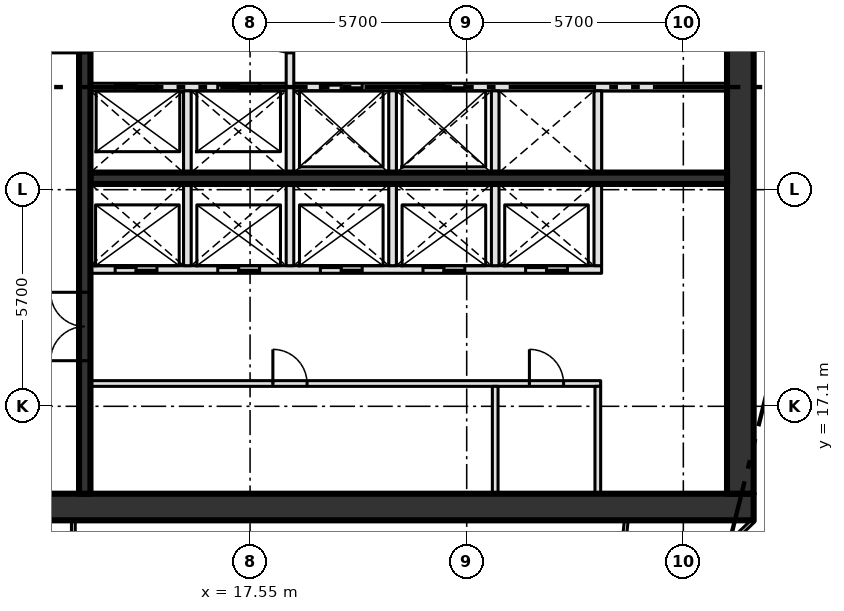
"""IFC4 building model, lengths in metres.
Left out: names, types, materials, properties, quantities, classifications, styles, units other than length and angle.
Written with IfcOpenShell. Run it as: python <this file> out.ifc"""

import sys

from ifc_helpers import new_model, si_unit, direction, frame, frame_2d, origin, place, context, subcontext, project, spatial, rectangle, extrude, element, fill, save


model = new_model("IFC4")
c1 = context("Model", 3, precision=1e-05, world=origin(), true_north=direction((0.0, 1.0)))
c2 = subcontext(c1, "Body", "Model", "MODEL_VIEW")
j1 = project(units=[si_unit("LENGTHUNIT", "METRE"), si_unit("PLANEANGLEUNIT", "RADIAN")], contexts=[c1])
p1 = place(None, origin())
s1 = spatial("IfcSite", under=j1, at=p1, CompositionType="ELEMENT")
p2 = place(p1, origin())
s2 = spatial("IfcBuilding", under=s1, at=p2, CompositionType="ELEMENT")
p3 = place(p2, frame((0.0, 0.0, 225.6)))
s3 = spatial("IfcBuildingStorey", under=s2, at=p3, CompositionType="ELEMENT", Elevation=225.6)
p4 = place(p3, frame((8.0, 14.45, -0.3), z_axis=(0.0, 0.0, 1.0), x_axis=(1.0, 0.0, 0.0)))
e1 = element("IfcWall", 1, at=p4, inside=s3, PredefinedType="SHEAR", context=c2, shape_type="SweptSolid", body=[
    extrude(rectangle(XDim=22.8, YDim=0.7, at=frame_2d((11.4, 0.0))), origin(), (0.0, 0.0, 1.0), 4.2),
])
p5 = place(p4, frame((2.3, 0.0, 0.3)))
e2 = element("IfcOpeningElement", 2, at=p5, cuts=e1, PredefinedType="OPENING", context=c2, shape_type="SweptSolid", body=[
    extrude(rectangle(XDim=1.8, YDim=2.1, at=frame_2d((0.9, 1.05))), frame((0.0, 0.36, 0.0), z_axis=(0.0, -1.0, 0.0), x_axis=(1.0, 0.0, 0.0)), (0.0, 0.0, 1.0), 0.72),
])
p6 = place(p3, frame((30.45, 14.8, -0.3), z_axis=(0.0, 0.0, 1.0), x_axis=(0.0, 1.0, 0.0)))
e3 = element("IfcWall", 3, at=p6, inside=s3, PredefinedType="SHEAR", context=c2, shape_type="SweptSolid", body=[
    extrude(rectangle(XDim=20.9, YDim=0.7, at=frame_2d((10.45, 0.0))), origin(), (0.0, 0.0, 1.0), 4.2),
])
p7 = place(p3, frame((13.35, 17.7, 0.0), z_axis=(0.0, 0.0, 1.0), x_axis=(1.0, 0.0, 0.0)))
e4 = element("IfcWall", 4, at=p7, inside=s3, PredefinedType="PARTITIONING", context=c2, shape_type="SweptSolid", body=[
    extrude(rectangle(XDim=13.425, YDim=0.15, at=frame_2d((6.712, 0.0))), origin(), (0.0, 0.0, 1.0), 3.9),
])
p8 = place(p7, frame((4.8, 0.0, 0.0)))
e5 = element("IfcOpeningElement", 5, at=p8, cuts=e4, PredefinedType="OPENING", context=c2, shape_type="SweptSolid", body=[
    extrude(rectangle(XDim=0.9, YDim=2.1, at=frame_2d((0.45, 1.05))), frame((0.0, 0.085, 0.0), z_axis=(0.0, -1.0, 0.0), x_axis=(1.0, 0.0, 0.0)), (0.0, 0.0, 1.0), 0.17),
])
p9 = place(p7, frame((11.55, 0.0, 0.0)))
e6 = element("IfcOpeningElement", 6, at=p9, cuts=e4, PredefinedType="OPENING", context=c2, shape_type="SweptSolid", body=[
    extrude(rectangle(XDim=0.9, YDim=2.1, at=frame_2d((0.45, 1.05))), frame((0.0, 0.085, 0.0), z_axis=(0.0, -1.0, 0.0), x_axis=(1.0, 0.0, 0.0)), (0.0, 0.0, 1.0), 0.17),
])
p10 = place(p3, frame((13.35, 20.7, 0.0), z_axis=(0.0, 0.0, 1.0), x_axis=(1.0, 0.0, 0.0)))
e7 = element("IfcWall", 7, at=p10, inside=s3, PredefinedType="SOLIDWALL", context=c2, shape_type="SweptSolid", body=[
    extrude(rectangle(XDim=13.45, YDim=0.2, at=frame_2d((6.725, 0.0))), origin(), (0.0, 0.0, 1.0), 3.9),
])
p11 = place(p10, frame((0.65, 0.0, 0.0)))
e8 = element("IfcOpeningElement", 8, at=p11, cuts=e7, PredefinedType="OPENING", context=c2, shape_type="SweptSolid", body=[
    extrude(rectangle(XDim=1.1, YDim=2.1, at=frame_2d((0.55, 1.05))), frame((0.0, 0.11, 0.0), z_axis=(0.0, -1.0, 0.0), x_axis=(1.0, 0.0, 0.0)), (0.0, 0.0, 1.0), 0.22),
])
p12 = place(p10, frame((3.35, 0.0, 0.0)))
e9 = element("IfcOpeningElement", 9, at=p12, cuts=e7, PredefinedType="OPENING", context=c2, shape_type="SweptSolid", body=[
    extrude(rectangle(XDim=1.1, YDim=2.1, at=frame_2d((0.55, 1.05))), frame((0.0, 0.11, 0.0), z_axis=(0.0, -1.0, 0.0), x_axis=(1.0, 0.0, 0.0)), (0.0, 0.0, 1.0), 0.22),
])
p13 = place(p10, frame((6.05, 0.0, 0.0)))
e10 = element("IfcOpeningElement", 10, at=p13, cuts=e7, PredefinedType="OPENING", context=c2, shape_type="SweptSolid", body=[
    extrude(rectangle(XDim=1.1, YDim=2.1, at=frame_2d((0.55, 1.05))), frame((0.0, 0.11, 0.0), z_axis=(0.0, -1.0, 0.0), x_axis=(1.0, 0.0, 0.0)), (0.0, 0.0, 1.0), 0.22),
])
p14 = place(p10, frame((8.75, 0.0, 0.0)))
e11 = element("IfcOpeningElement", 11, at=p14, cuts=e7, PredefinedType="OPENING", context=c2, shape_type="SweptSolid", body=[
    extrude(rectangle(XDim=1.1, YDim=2.1, at=frame_2d((0.55, 1.05))), frame((0.0, 0.11, 0.0), z_axis=(0.0, -1.0, 0.0), x_axis=(1.0, 0.0, 0.0)), (0.0, 0.0, 1.0), 0.22),
])
p15 = place(p10, frame((11.45, 0.0, 0.0)))
e12 = element("IfcOpeningElement", 12, at=p15, cuts=e7, PredefinedType="OPENING", context=c2, shape_type="SweptSolid", body=[
    extrude(rectangle(XDim=1.1, YDim=2.1, at=frame_2d((0.55, 1.05))), frame((0.0, 0.11, 0.0), z_axis=(0.0, -1.0, 0.0), x_axis=(1.0, 0.0, 0.0)), (0.0, 0.0, 1.0), 0.22),
])
p16 = place(p3, frame((13.35, 23.1, 0.0), z_axis=(0.0, 0.0, 1.0), x_axis=(1.0, 0.0, 0.0)))
e13 = element("IfcWall", 13, at=p16, inside=s3, PredefinedType="SHEAR", context=c2, shape_type="SweptSolid", body=[
    extrude(rectangle(XDim=16.75, YDim=0.3, at=frame_2d((8.375, 0.0))), origin(), (0.0, 0.0, 1.0), 3.9),
])
p17 = place(p3, frame((13.35, 25.5, 0.0), z_axis=(0.0, 0.0, 1.0), x_axis=(1.0, 0.0, 0.0)))
e14 = element("IfcWall", 14, at=p17, inside=s3, PredefinedType="SOLIDWALL", context=c2, shape_type="SweptSolid", body=[
    extrude(rectangle(XDim=16.75, YDim=0.2, at=frame_2d((8.375, 0.0))), origin(), (0.0, 0.0, 1.0), 3.9),
])
p18 = place(p17, frame((0.65, 0.0, 0.0)))
e15 = element("IfcOpeningElement", 15, at=p18, cuts=e14, PredefinedType="OPENING", context=c2, shape_type="SweptSolid", body=[
    extrude(rectangle(XDim=1.1, YDim=2.1, at=frame_2d((0.55, 1.05))), frame((0.0, 0.11, 0.0), z_axis=(0.0, -1.0, 0.0), x_axis=(1.0, 0.0, 0.0)), (0.0, 0.0, 1.0), 0.22),
])
p19 = place(p17, frame((3.35, 0.0, 0.0)))
e16 = element("IfcOpeningElement", 16, at=p19, cuts=e14, PredefinedType="OPENING", context=c2, shape_type="SweptSolid", body=[
    extrude(rectangle(XDim=1.1, YDim=2.1, at=frame_2d((0.55, 1.05))), frame((0.0, 0.11, 0.0), z_axis=(0.0, -1.0, 0.0), x_axis=(1.0, 0.0, 0.0)), (0.0, 0.0, 1.0), 0.22),
])
p20 = place(p17, frame((6.05, 0.0, 0.0)))
e17 = element("IfcOpeningElement", 17, at=p20, cuts=e14, PredefinedType="OPENING", context=c2, shape_type="SweptSolid", body=[
    extrude(rectangle(XDim=1.1, YDim=2.1, at=frame_2d((0.55, 1.05))), frame((0.0, 0.11, 0.0), z_axis=(0.0, -1.0, 0.0), x_axis=(1.0, 0.0, 0.0)), (0.0, 0.0, 1.0), 0.22),
])
p21 = place(p17, frame((8.75, 0.0, 0.0)))
e18 = element("IfcOpeningElement", 18, at=p21, cuts=e14, PredefinedType="OPENING", context=c2, shape_type="SweptSolid", body=[
    extrude(rectangle(XDim=1.1, YDim=2.1, at=frame_2d((0.55, 1.05))), frame((0.0, 0.11, 0.0), z_axis=(0.0, -1.0, 0.0), x_axis=(1.0, 0.0, 0.0)), (0.0, 0.0, 1.0), 0.22),
])
p22 = place(p3, frame((13.2, 14.8, 0.0), z_axis=(0.0, 0.0, 1.0), x_axis=(0.0, 1.0, 0.0)))
e19 = element("IfcWall", 19, at=p22, inside=s3, PredefinedType="SHEAR", context=c2, shape_type="SweptSolid", body=[
    extrude(rectangle(XDim=20.9, YDim=0.3, at=frame_2d((10.45, 0.0))), origin(), (0.0, 0.0, 1.0), 3.9),
])
p23 = place(p22, frame((3.5, 0.0, 0.0)))
e20 = element("IfcOpeningElement", 20, at=p23, cuts=e19, PredefinedType="OPENING", context=c2, shape_type="SweptSolid", body=[
    extrude(rectangle(XDim=1.8, YDim=2.1, at=frame_2d((0.9, 1.05))), frame((0.0, 0.16, 0.0), z_axis=(0.0, -1.0, 0.0), x_axis=(1.0, 0.0, 0.0)), (0.0, 0.0, 1.0), 0.32),
])
p24 = place(p22, frame((11.6, 0.0, 0.0)))
e21 = element("IfcOpeningElement", 21, at=p24, cuts=e19, PredefinedType="OPENING", context=c2, shape_type="SweptSolid", body=[
    extrude(rectangle(XDim=1.2, YDim=2.1, at=frame_2d((0.6, 1.05))), frame((0.0, 0.16, 0.0), z_axis=(0.0, -1.0, 0.0), x_axis=(1.0, 0.0, 0.0)), (0.0, 0.0, 1.0), 0.32),
])
p25 = place(p3, frame((15.9, 20.8, 0.0), z_axis=(0.0, 0.0, 1.0), x_axis=(0.0, 1.0, 0.0)))
e22 = element("IfcWall", 22, at=p25, inside=s3, PredefinedType="SOLIDWALL", context=c2, shape_type="SweptSolid", body=[
    extrude(rectangle(XDim=4.6, YDim=0.2, at=frame_2d((2.3, 0.0))), origin(), (0.0, 0.0, 1.0), 3.9),
])
p26 = place(p3, frame((18.6, 20.8, 0.0), z_axis=(0.0, 0.0, 1.0), x_axis=(0.0, 1.0, 0.0)))
e23 = element("IfcWall", 23, at=p26, inside=s3, PredefinedType="SOLIDWALL", context=c2, shape_type="SweptSolid", body=[
    extrude(rectangle(XDim=7.6, YDim=0.2, at=frame_2d((3.8, 0.0))), origin(), (0.0, 0.0, 1.0), 3.9),
])
p27 = place(p26, frame((5.6, 0.0, 0.0)))
e24 = element("IfcOpeningElement", 24, at=p27, cuts=e23, PredefinedType="OPENING", context=c2, shape_type="SweptSolid", body=[
    extrude(rectangle(XDim=1.2, YDim=2.1, at=frame_2d((0.6, 1.05))), frame((0.0, 0.11, 0.0), z_axis=(0.0, -1.0, 0.0), x_axis=(1.0, 0.0, 0.0)), (0.0, 0.0, 1.0), 0.22),
])
p28 = place(p3, frame((21.3, 20.8, 0.0), z_axis=(0.0, 0.0, 1.0), x_axis=(0.0, 1.0, 0.0)))
e25 = element("IfcWall", 25, at=p28, inside=s3, PredefinedType="SOLIDWALL", context=c2, shape_type="SweptSolid", body=[
    extrude(rectangle(XDim=4.6, YDim=0.2, at=frame_2d((2.3, 0.0))), origin(), (0.0, 0.0, 1.0), 3.9),
])
p29 = place(p3, frame((24.0, 14.8, 0.0), z_axis=(0.0, 0.0, 1.0), x_axis=(0.0, 1.0, 0.0)))
e26 = element("IfcWall", 26, at=p29, inside=s3, PredefinedType="PARTITIONING", context=c2, shape_type="SweptSolid", body=[
    extrude(rectangle(XDim=2.825, YDim=0.15, at=frame_2d((1.413, 0.0))), origin(), (0.0, 0.0, 1.0), 3.9),
])
p30 = place(p3, frame((24.0, 20.8, 0.0), z_axis=(0.0, 0.0, 1.0), x_axis=(0.0, 1.0, 0.0)))
e27 = element("IfcWall", 27, at=p30, inside=s3, PredefinedType="SOLIDWALL", context=c2, shape_type="SweptSolid", body=[
    extrude(rectangle(XDim=4.6, YDim=0.2, at=frame_2d((2.3, 0.0))), origin(), (0.0, 0.0, 1.0), 3.9),
])
p31 = place(p3, frame((26.7, 14.8, 0.0), z_axis=(0.0, 0.0, 1.0), x_axis=(0.0, 1.0, 0.0)))
e28 = element("IfcWall", 28, at=p31, inside=s3, PredefinedType="PARTITIONING", context=c2, shape_type="SweptSolid", body=[
    extrude(rectangle(XDim=2.825, YDim=0.15, at=frame_2d((1.413, 0.0))), origin(), (0.0, 0.0, 1.0), 3.9),
])
p32 = place(p3, frame((26.7, 20.8, 0.0), z_axis=(0.0, 0.0, 1.0), x_axis=(0.0, 1.0, 0.0)))
e29 = element("IfcWall", 29, at=p32, inside=s3, PredefinedType="SOLIDWALL", context=c2, shape_type="SweptSolid", body=[
    extrude(rectangle(XDim=4.6, YDim=0.2, at=frame_2d((2.3, 0.0))), origin(), (0.0, 0.0, 1.0), 3.9),
])
p33 = place(p3, frame((12.9, 10.078, 0.0), z_axis=(0.0, 0.0, 1.0), x_axis=(0.0, 1.0, 0.0)))
e30 = element("IfcWall", 30, at=p33, inside=s3, PredefinedType="PARTITIONING", context=c2, shape_type="SweptSolid", body=[
    extrude(rectangle(XDim=4.022, YDim=0.1, at=frame_2d((2.011, 0.0))), origin(), (0.0, 0.0, 1.0), 3.9),
])
p34 = place(p33, frame((1.18, 0.0, 0.0)))
e31 = element("IfcOpeningElement", 31, at=p34, cuts=e30, PredefinedType="OPENING", context=c2, shape_type="SweptSolid", body=[
    extrude(rectangle(XDim=1.8, YDim=2.1, at=frame_2d((0.9, 1.05))), frame((0.0, 0.06, 0.0), z_axis=(0.0, -1.0, 0.0), x_axis=(1.0, 0.0, 0.0)), (0.0, 0.0, 1.0), 0.12),
])
p35 = place(p3, frame((30.8, 14.1, 0.0), z_axis=(0.0, 0.0, 1.0), x_axis=(-0.722911025189, -0.690941133281, 0.0)))
e32 = element("IfcWall", 32, at=p35, inside=s3, PredefinedType="PARTITIONING", context=c2, shape_type="SweptSolid", body=[
    extrude(rectangle(XDim=0.748, YDim=0.1, at=frame_2d((0.374, 0.0))), origin(), (0.0, 0.0, 1.0), 3.9),
])
p36 = place(p3, frame((26.608, 6.105, 0.0), z_axis=(0.0, 0.0, 1.0), x_axis=(0.104619970127, 0.994512273353, 0.0)))
e33 = element("IfcWall", 33, at=p36, inside=s3, PredefinedType="PARTITIONING", context=c2, shape_type="SweptSolid", body=[
    extrude(rectangle(XDim=8.039, YDim=0.1, at=frame_2d((4.02, 0.0))), origin(), (0.0, 0.0, 1.0), 3.9),
])
p37 = place(p11, origin())
e34 = element("IfcDoor", 34, at=p37, inside=s3, OperationType="SLIDING_TO_LEFT", PredefinedType="DOOR", context=c2, shape_type="SweptSolid", body=[
    extrude(rectangle(XDim=1.1, YDim=2.1, at=frame_2d((0.55, 1.05))), frame((0.0, 0.025, 0.0), z_axis=(0.0, -1.0, 0.0), x_axis=(1.0, 0.0, 0.0)), (0.0, 0.0, 1.0), 0.05),
])
fill(e8, e34)
p38 = place(p12, origin())
e35 = element("IfcDoor", 35, at=p38, inside=s3, OperationType="SLIDING_TO_LEFT", PredefinedType="DOOR", context=c2, shape_type="SweptSolid", body=[
    extrude(rectangle(XDim=1.1, YDim=2.1, at=frame_2d((0.55, 1.05))), frame((0.0, 0.025, 0.0), z_axis=(0.0, -1.0, 0.0), x_axis=(1.0, 0.0, 0.0)), (0.0, 0.0, 1.0), 0.05),
])
fill(e9, e35)
p39 = place(p13, origin())
e36 = element("IfcDoor", 36, at=p39, inside=s3, OperationType="SLIDING_TO_LEFT", PredefinedType="DOOR", context=c2, shape_type="SweptSolid", body=[
    extrude(rectangle(XDim=1.1, YDim=2.1, at=frame_2d((0.55, 1.05))), frame((0.0, 0.025, 0.0), z_axis=(0.0, -1.0, 0.0), x_axis=(1.0, 0.0, 0.0)), (0.0, 0.0, 1.0), 0.05),
])
fill(e10, e36)
p40 = place(p14, origin())
e37 = element("IfcDoor", 37, at=p40, inside=s3, OperationType="SLIDING_TO_LEFT", PredefinedType="DOOR", context=c2, shape_type="SweptSolid", body=[
    extrude(rectangle(XDim=1.1, YDim=2.1, at=frame_2d((0.55, 1.05))), frame((0.0, 0.025, 0.0), z_axis=(0.0, -1.0, 0.0), x_axis=(1.0, 0.0, 0.0)), (0.0, 0.0, 1.0), 0.05),
])
fill(e11, e37)
p41 = place(p15, origin())
e38 = element("IfcDoor", 38, at=p41, inside=s3, OperationType="SLIDING_TO_LEFT", PredefinedType="DOOR", context=c2, shape_type="SweptSolid", body=[
    extrude(rectangle(XDim=1.1, YDim=2.1, at=frame_2d((0.55, 1.05))), frame((0.0, 0.025, 0.0), z_axis=(0.0, -1.0, 0.0), x_axis=(1.0, 0.0, 0.0)), (0.0, 0.0, 1.0), 0.05),
])
fill(e12, e38)
p42 = place(p18, origin())
e39 = element("IfcDoor", 39, at=p42, inside=s3, OperationType="SLIDING_TO_LEFT", PredefinedType="DOOR", context=c2, shape_type="SweptSolid", body=[
    extrude(rectangle(XDim=1.1, YDim=2.1, at=frame_2d((0.55, 1.05))), frame((0.0, 0.025, 0.0), z_axis=(0.0, -1.0, 0.0), x_axis=(1.0, 0.0, 0.0)), (0.0, 0.0, 1.0), 0.05),
])
fill(e15, e39)
p43 = place(p19, origin())
e40 = element("IfcDoor", 40, at=p43, inside=s3, OperationType="SLIDING_TO_LEFT", PredefinedType="DOOR", context=c2, shape_type="SweptSolid", body=[
    extrude(rectangle(XDim=1.1, YDim=2.1, at=frame_2d((0.55, 1.05))), frame((0.0, 0.025, 0.0), z_axis=(0.0, -1.0, 0.0), x_axis=(1.0, 0.0, 0.0)), (0.0, 0.0, 1.0), 0.05),
])
fill(e16, e40)
p44 = place(p20, origin())
e41 = element("IfcDoor", 41, at=p44, inside=s3, OperationType="SLIDING_TO_LEFT", PredefinedType="DOOR", context=c2, shape_type="SweptSolid", body=[
    extrude(rectangle(XDim=1.1, YDim=2.1, at=frame_2d((0.55, 1.05))), frame((0.0, 0.025, 0.0), z_axis=(0.0, -1.0, 0.0), x_axis=(1.0, 0.0, 0.0)), (0.0, 0.0, 1.0), 0.05),
])
fill(e17, e41)
p45 = place(p21, origin())
e42 = element("IfcDoor", 42, at=p45, inside=s3, OperationType="SLIDING_TO_LEFT", PredefinedType="DOOR", context=c2, shape_type="SweptSolid", body=[
    extrude(rectangle(XDim=1.1, YDim=2.1, at=frame_2d((0.55, 1.05))), frame((0.0, 0.025, 0.0), z_axis=(0.0, -1.0, 0.0), x_axis=(1.0, 0.0, 0.0)), (0.0, 0.0, 1.0), 0.05),
])
fill(e18, e42)
p46 = place(p8, origin())
e43 = element("IfcDoor", 43, at=p46, inside=s3, OperationType="SINGLE_SWING_LEFT", PredefinedType="DOOR", context=c2, shape_type="SweptSolid", body=[
    extrude(rectangle(XDim=0.9, YDim=2.1, at=frame_2d((0.45, 1.05))), frame((0.0, 0.025, 0.0), z_axis=(0.0, -1.0, 0.0), x_axis=(1.0, 0.0, 0.0)), (0.0, 0.0, 1.0), 0.05),
])
fill(e5, e43)
p47 = place(p9, origin())
e44 = element("IfcDoor", 44, at=p47, inside=s3, OperationType="SINGLE_SWING_LEFT", PredefinedType="DOOR", context=c2, shape_type="SweptSolid", body=[
    extrude(rectangle(XDim=0.9, YDim=2.1, at=frame_2d((0.45, 1.05))), frame((0.0, 0.025, 0.0), z_axis=(0.0, -1.0, 0.0), x_axis=(1.0, 0.0, 0.0)), (0.0, 0.0, 1.0), 0.05),
])
fill(e6, e44)
p48 = place(p23, origin())
e45 = element("IfcDoor", 45, at=p48, inside=s3, OperationType="DOUBLE_DOOR_SINGLE_SWING", PredefinedType="DOOR", context=c2, shape_type="SweptSolid", body=[
    extrude(rectangle(XDim=1.8, YDim=2.1, at=frame_2d((0.9, 1.05))), frame((0.0, 0.025, 0.0), z_axis=(0.0, -1.0, 0.0), x_axis=(1.0, 0.0, 0.0)), (0.0, 0.0, 1.0), 0.05),
])
fill(e20, e45)
save(model, sys.argv[1])
